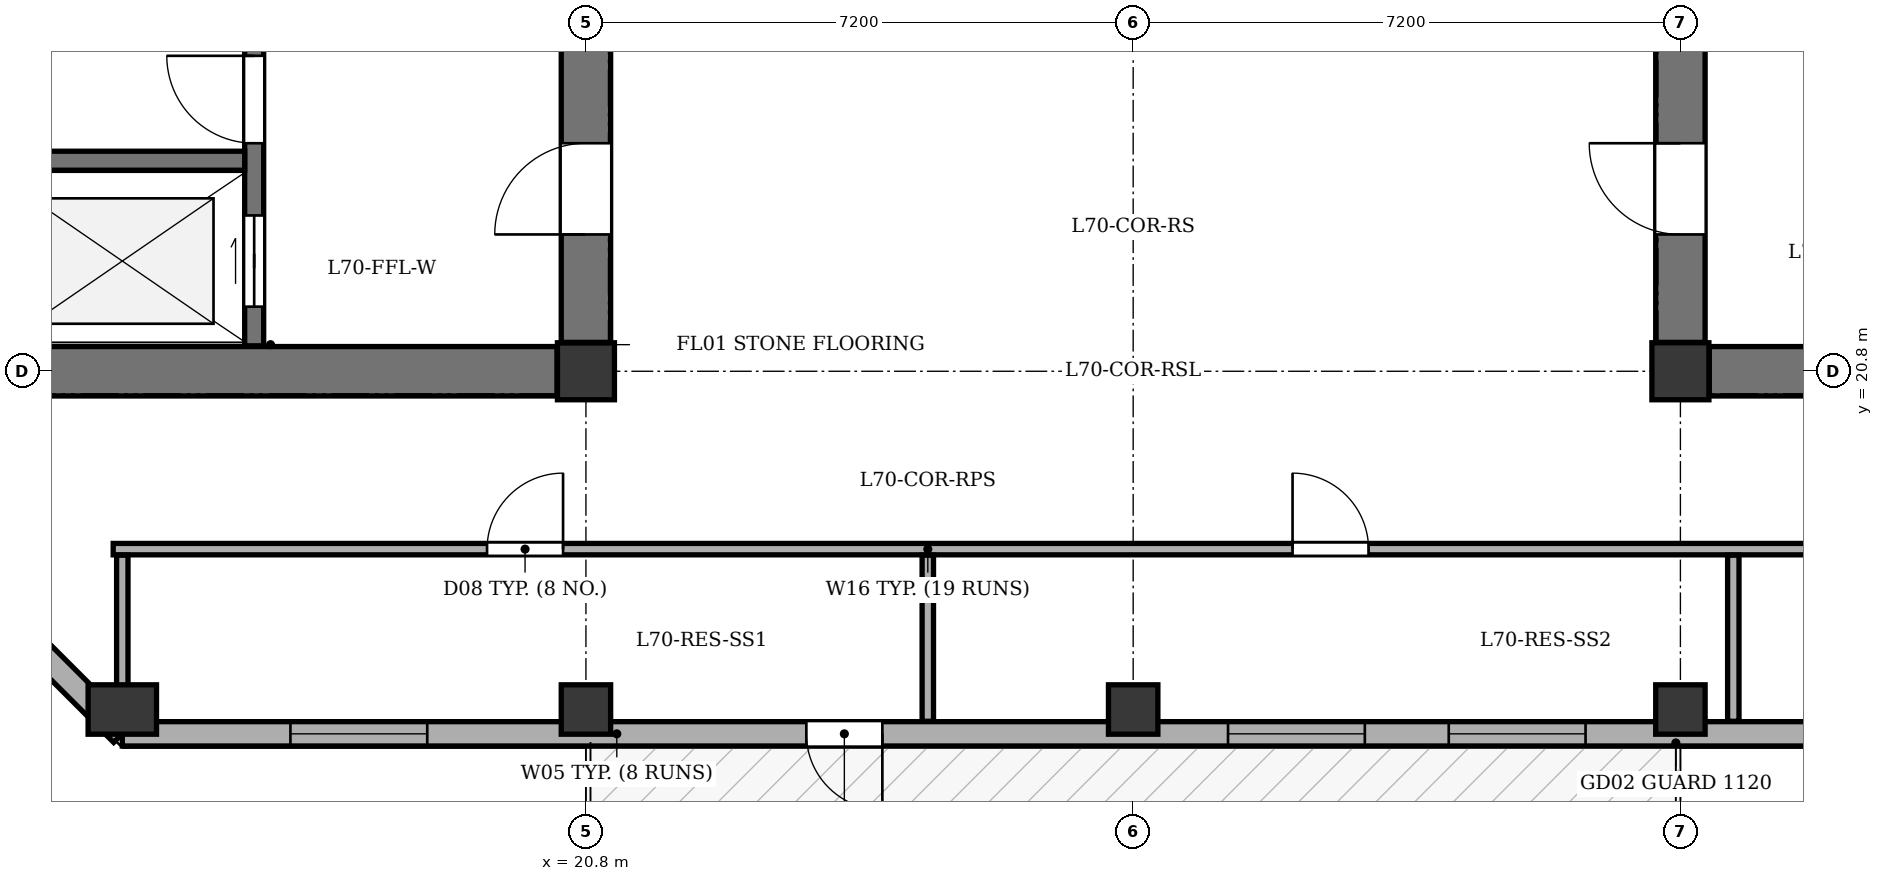
"""IFC4 building model, lengths in metres.
Left out: names, types, materials, properties, quantities, classifications, styles, units other than length and angle.
Written with IfcOpenShell. Run it as: python <this file> out.ifc"""

import sys

from ifc_helpers import new_model, si_unit, direction, frame, frame_2d, origin, origin_2d, place, context, subcontext, project, spatial, rectangle, extrude, element, fill, save


model = new_model("IFC4")
c1 = context("Model", 3, precision=1e-05, world=origin(), true_north=direction((0.0, 1.0)))
c2 = subcontext(c1, "Body", "Model", "MODEL_VIEW")
j1 = project(units=[si_unit("LENGTHUNIT", "METRE"), si_unit("PLANEANGLEUNIT", "RADIAN")], contexts=[c1])
p1 = place(None, origin())
s1 = spatial("IfcSite", under=j1, at=p1, CompositionType="ELEMENT")
p2 = place(p1, origin())
s2 = spatial("IfcBuilding", under=s1, at=p2, CompositionType="ELEMENT")
p3 = place(p2, frame((0.0, 0.0, 265.3)))
s3 = spatial("IfcBuildingStorey", under=s2, at=p3, CompositionType="ELEMENT", Elevation=265.3)
for number, where, z_axis, x_axis in (
    (1, (20.8, 20.8, 0.0), (0.0, 0.0, 1.0), (1.0, 0.0, 0.0)),
    (2, (35.2, 20.8, 0.0), (0.0, 0.0, 1.0), (1.0, 0.0, 0.0)),
):
    element("IfcColumn", number, at=place(p3, frame(where, z_axis=z_axis, x_axis=x_axis)), inside=s3, PredefinedType="COLUMN", context=c2, shape_type="SweptSolid", body=[
        extrude(rectangle(XDim=0.75, YDim=0.75, at=origin_2d()), origin(), (0.0, 0.0, 1.0), 3.4),
    ])
p4 = place(p3, frame((14.7, 16.35, 0.0), z_axis=(0.0, 0.0, 1.0), x_axis=(1.0, 0.0, 0.0)))
e3 = element("IfcColumn", 3, at=p4, inside=s3, PredefinedType="COLUMN", context=c2, shape_type="SweptSolid", body=[
    extrude(rectangle(XDim=0.65, YDim=0.9, at=origin_2d()), origin(), (0.0, 0.0, 1.0), 3.4),
])
for number, where, z_axis, x_axis in (
    (4, (20.8, 16.35, 0.0), (0.0, 0.0, 1.0), (1.0, 0.0, 0.0)),
    (5, (28.0, 16.35, 0.0), (0.0, 0.0, 1.0), (1.0, 0.0, 0.0)),
    (6, (35.2, 16.35, 0.0), (0.0, 0.0, 1.0), (1.0, 0.0, 0.0)),
):
    element("IfcColumn", number, at=place(p3, frame(where, z_axis=z_axis, x_axis=x_axis)), inside=s3, PredefinedType="COLUMN", context=c2, shape_type="SweptSolid", body=[
        extrude(rectangle(XDim=0.65, YDim=0.65, at=origin_2d()), origin(), (0.0, 0.0, 1.0), 3.4),
    ])
p5 = place(p3, frame((51.7, 16.03, 0.0), z_axis=(0.0, 0.0, 1.0), x_axis=(-1.0, 0.0, 0.0)))
e7 = element("IfcWall", 7, at=p5, inside=s3, PredefinedType="STANDARD", context=c2, shape_type="SweptSolid", body=[
    extrude(rectangle(XDim=37.0, YDim=0.32, at=frame_2d((18.5, 0.0))), origin(), (0.0, 0.0, 1.0), 2.335),
])
p6 = place(p5, frame((27.0, 0.0, 0.0)))
e8 = element("IfcOpeningElement", 8, at=p6, cuts=e7, PredefinedType="OPENING", context=c2, shape_type="SweptSolid", body=[
    extrude(rectangle(XDim=1.0, YDim=2.02, at=frame_2d((0.5, 1.01))), frame((0.0, 0.17, 0.0), z_axis=(0.0, -1.0, 0.0), x_axis=(1.0, 0.0, 0.0)), (0.0, 0.0, 1.0), 0.34),
])
p7 = place(p5, frame((2.375, 0.0, 0.75)))
e9 = element("IfcOpeningElement", 9, at=p7, cuts=e7, PredefinedType="OPENING", context=c2, shape_type="SweptSolid", body=[
    extrude(rectangle(XDim=1.8, YDim=1.465, at=frame_2d((0.9, 0.732))), frame((0.0, 0.17, 0.0), z_axis=(0.0, -1.0, 0.0), x_axis=(1.0, 0.0, 0.0)), (0.0, 0.0, 1.0), 0.34),
])
p8 = place(p5, frame((8.422, 0.0, 0.75)))
e10 = element("IfcOpeningElement", 10, at=p8, cuts=e7, PredefinedType="OPENING", context=c2, shape_type="SweptSolid", body=[
    extrude(rectangle(XDim=1.8, YDim=1.465, at=frame_2d((0.9, 0.732))), frame((0.0, 0.17, 0.0), z_axis=(0.0, -1.0, 0.0), x_axis=(1.0, 0.0, 0.0)), (0.0, 0.0, 1.0), 0.34),
])
p9 = place(p5, frame((12.102, 0.0, 0.75)))
e11 = element("IfcOpeningElement", 11, at=p9, cuts=e7, PredefinedType="OPENING", context=c2, shape_type="SweptSolid", body=[
    extrude(rectangle(XDim=2.2, YDim=1.465, at=frame_2d((1.1, 0.732))), frame((0.0, 0.17, 0.0), z_axis=(0.0, -1.0, 0.0), x_axis=(1.0, 0.0, 0.0)), (0.0, 0.0, 1.0), 0.34),
])
p10 = place(p5, frame((17.748, 0.0, 0.75)))
e12 = element("IfcOpeningElement", 12, at=p10, cuts=e7, PredefinedType="OPENING", context=c2, shape_type="SweptSolid", body=[
    extrude(rectangle(XDim=1.8, YDim=1.465, at=frame_2d((0.9, 0.732))), frame((0.0, 0.17, 0.0), z_axis=(0.0, -1.0, 0.0), x_axis=(1.0, 0.0, 0.0)), (0.0, 0.0, 1.0), 0.34),
])
p11 = place(p5, frame((20.652, 0.0, 0.75)))
e13 = element("IfcOpeningElement", 13, at=p11, cuts=e7, PredefinedType="OPENING", context=c2, shape_type="SweptSolid", body=[
    extrude(rectangle(XDim=1.8, YDim=1.465, at=frame_2d((0.9, 0.732))), frame((0.0, 0.17, 0.0), z_axis=(0.0, -1.0, 0.0), x_axis=(1.0, 0.0, 0.0)), (0.0, 0.0, 1.0), 0.34),
])
p12 = place(p5, frame((32.988, 0.0, 0.75)))
e14 = element("IfcOpeningElement", 14, at=p12, cuts=e7, PredefinedType="OPENING", context=c2, shape_type="SweptSolid", body=[
    extrude(rectangle(XDim=1.8, YDim=1.465, at=frame_2d((0.9, 0.732))), frame((0.0, 0.17, 0.0), z_axis=(0.0, -1.0, 0.0), x_axis=(1.0, 0.0, 0.0)), (0.0, 0.0, 1.0), 0.34),
])
p13 = place(p3, frame((14.7, 16.03, 0.0), z_axis=(0.0, 0.0, 1.0), x_axis=(-0.707106781187, 0.707106781187, 0.0)))
e15 = element("IfcWall", 15, at=p13, inside=s3, PredefinedType="STANDARD", context=c2, shape_type="SweptSolid", body=[
    extrude(rectangle(XDim=5.402, YDim=0.32, at=frame_2d((2.701, 0.0))), origin(), (0.0, 0.0, 1.0), 2.335),
])
p14 = place(p13, frame((2.001, 0.0, 0.75)))
e16 = element("IfcOpeningElement", 16, at=p14, cuts=e15, PredefinedType="OPENING", context=c2, shape_type="SweptSolid", body=[
    extrude(rectangle(XDim=1.4, YDim=1.465, at=frame_2d((0.7, 0.732))), frame((0.0, 0.17, 0.0), z_axis=(0.0, -1.0, 0.0), x_axis=(1.0, 0.0, 0.0)), (0.0, 0.0, 1.0), 0.34),
])
p15 = place(p3, frame((13.18, 20.8, 0.0), z_axis=(0.0, 0.0, 1.0), x_axis=(1.0, 0.0, 0.0)))
e17 = element("IfcWall", 17, at=p15, inside=s3, PredefinedType="SHEAR", context=c2, shape_type="SweptSolid", body=[
    extrude(rectangle(XDim=7.24, YDim=0.65, at=frame_2d((3.62, 0.0))), origin(), (0.0, 0.0, 1.0), 2.95),
])
p16 = place(p3, frame((20.8, 21.18, 0.0), z_axis=(0.0, 0.0, 1.0), x_axis=(0.0, 1.0, 0.0)))
e18 = element("IfcWall", 18, at=p16, inside=s3, PredefinedType="SHEAR", context=c2, shape_type="SweptSolid", body=[
    extrude(rectangle(XDim=3.87, YDim=0.65, at=frame_2d((1.935, 0.0))), origin(), (0.0, 0.0, 1.0), 2.95),
])
p17 = place(p16, frame((1.42, 0.0, 0.0)))
e19 = element("IfcOpeningElement", 19, at=p17, cuts=e18, PredefinedType="OPENING", context=c2, shape_type="SweptSolid", body=[
    extrude(rectangle(XDim=1.2, YDim=2.15, at=frame_2d((0.6, 1.075))), frame((0.0, 0.335, 0.0), z_axis=(0.0, -1.0, 0.0), x_axis=(1.0, 0.0, 0.0)), (0.0, 0.0, 1.0), 0.67),
])
p18 = place(p3, frame((16.435, 21.135, 0.0), z_axis=(0.0, 0.0, 1.0), x_axis=(0.0, 1.0, 0.0)))
e20 = element("IfcWall", 20, at=p18, inside=s3, PredefinedType="SHEAR", context=c2, shape_type="SweptSolid", body=[
    extrude(rectangle(XDim=12.13, YDim=0.25, at=frame_2d((6.065, 0.0))), origin(), (0.0, 0.0, 1.0), 2.95),
])
p19 = place(p18, frame((0.515, 0.0, 0.0)))
e21 = element("IfcOpeningElement", 21, at=p19, cuts=e20, PredefinedType="OPENING", context=c2, shape_type="SweptSolid", body=[
    extrude(rectangle(XDim=1.2, YDim=2.15, at=frame_2d((0.6, 1.075))), frame((0.0, 0.135, 0.0), z_axis=(0.0, -1.0, 0.0), x_axis=(1.0, 0.0, 0.0)), (0.0, 0.0, 1.0), 0.27),
])
p20 = place(p18, frame((2.665, 0.0, 0.0)))
e22 = element("IfcOpeningElement", 22, at=p20, cuts=e20, PredefinedType="OPENING", context=c2, shape_type="SweptSolid", body=[
    extrude(rectangle(XDim=1.15, YDim=2.15, at=frame_2d((0.575, 1.075))), frame((0.0, 0.135, 0.0), z_axis=(0.0, -1.0, 0.0), x_axis=(1.0, 0.0, 0.0)), (0.0, 0.0, 1.0), 0.27),
])
p21 = place(p3, frame((13.135, 23.57, 0.0), z_axis=(0.0, 0.0, 1.0), x_axis=(1.0, 0.0, 0.0)))
e23 = element("IfcWall", 23, at=p21, inside=s3, PredefinedType="SHEAR", context=c2, shape_type="SweptSolid", body=[
    extrude(rectangle(XDim=3.175, YDim=0.25, at=frame_2d((1.587, 0.0))), origin(), (0.0, 0.0, 1.0), 2.95),
])
p22 = place(p3, frame((35.58, 20.8, 0.0), z_axis=(0.0, 0.0, 1.0), x_axis=(1.0, 0.0, 0.0)))
e24 = element("IfcWall", 24, at=p22, inside=s3, PredefinedType="SHEAR", context=c2, shape_type="SweptSolid", body=[
    extrude(rectangle(XDim=7.24, YDim=0.65, at=frame_2d((3.62, 0.0))), origin(), (0.0, 0.0, 1.0), 2.95),
])
p23 = place(p3, frame((35.2, 21.18, 0.0), z_axis=(0.0, 0.0, 1.0), x_axis=(0.0, 1.0, 0.0)))
e25 = element("IfcWall", 25, at=p23, inside=s3, PredefinedType="SHEAR", context=c2, shape_type="SweptSolid", body=[
    extrude(rectangle(XDim=3.87, YDim=0.65, at=frame_2d((1.935, 0.0))), origin(), (0.0, 0.0, 1.0), 2.95),
])
p24 = place(p23, frame((1.42, 0.0, 0.0)))
e26 = element("IfcOpeningElement", 26, at=p24, cuts=e25, PredefinedType="OPENING", context=c2, shape_type="SweptSolid", body=[
    extrude(rectangle(XDim=1.2, YDim=2.15, at=frame_2d((0.6, 1.075))), frame((0.0, 0.335, 0.0), z_axis=(0.0, -1.0, 0.0), x_axis=(1.0, 0.0, 0.0)), (0.0, 0.0, 1.0), 0.67),
])
p25 = place(p3, frame((14.58, 18.46, 0.0), z_axis=(0.0, 0.0, 1.0), x_axis=(1.0, 0.0, 0.0)))
e27 = element("IfcWall", 27, at=p25, inside=s3, PredefinedType="PARTITIONING", context=c2, shape_type="SweptSolid", body=[
    extrude(rectangle(XDim=30.52, YDim=0.15, at=frame_2d((15.26, 0.0))), origin(), (0.0, 0.0, 1.0), 2.95),
])
p26 = place(p25, frame((4.919, 0.0, 0.0)))
e28 = element("IfcOpeningElement", 28, at=p26, cuts=e27, PredefinedType="OPENING", context=c2, shape_type="SweptSolid", body=[
    extrude(rectangle(XDim=1.0, YDim=2.1, at=frame_2d((0.5, 1.05))), frame((0.0, 0.085, 0.0), z_axis=(0.0, -1.0, 0.0), x_axis=(1.0, 0.0, 0.0)), (0.0, 0.0, 1.0), 0.17),
])
p27 = place(p25, frame((15.517, 0.0, 0.0)))
e29 = element("IfcOpeningElement", 29, at=p27, cuts=e27, PredefinedType="OPENING", context=c2, shape_type="SweptSolid", body=[
    extrude(rectangle(XDim=1.0, YDim=2.1, at=frame_2d((0.5, 1.05))), frame((0.0, 0.085, 0.0), z_axis=(0.0, -1.0, 0.0), x_axis=(1.0, 0.0, 0.0)), (0.0, 0.0, 1.0), 0.17),
])
p28 = place(p25, frame((25.358, 0.0, 0.0)))
e30 = element("IfcOpeningElement", 30, at=p28, cuts=e27, PredefinedType="OPENING", context=c2, shape_type="SweptSolid", body=[
    extrude(rectangle(XDim=1.0, YDim=2.1, at=frame_2d((0.5, 1.05))), frame((0.0, 0.085, 0.0), z_axis=(0.0, -1.0, 0.0), x_axis=(1.0, 0.0, 0.0)), (0.0, 0.0, 1.0), 0.17),
])
for number, where, z_axis, x_axis in (
    (31, (14.7, 16.195, 0.0), (0.0, 0.0, 1.0), (0.0, 1.0, 0.0)),
    (32, (25.298, 16.195, 0.0), (0.0, 0.0, 1.0), (0.0, 1.0, 0.0)),
    (33, (35.896, 16.195, 0.0), (0.0, 0.0, 1.0), (0.0, 1.0, 0.0)),
):
    element("IfcWall", number, at=place(p3, frame(where, z_axis=z_axis, x_axis=x_axis)), inside=s3, PredefinedType="PARTITIONING", context=c2, shape_type="SweptSolid", body=[
        extrude(rectangle(XDim=2.185, YDim=0.15, at=frame_2d((1.092, 0.0))), origin(), (0.0, 0.0, 1.0), 2.95),
    ])
p29 = place(p6, origin())
e34 = element("IfcDoor", 34, at=p29, inside=s3, OperationType="SINGLE_SWING_LEFT", PredefinedType="DOOR", context=c2, shape_type="SweptSolid", body=[
    extrude(rectangle(XDim=1.0, YDim=2.02, at=frame_2d((0.5, 1.01))), frame((0.0, 0.025, 0.0), z_axis=(0.0, -1.0, 0.0), x_axis=(1.0, 0.0, 0.0)), (0.0, 0.0, 1.0), 0.05),
])
fill(e8, e34)
p30 = place(p10, origin())
e35 = element("IfcWindow", 35, at=p30, inside=s3, PartitioningType="SINGLE_PANEL", PredefinedType="WINDOW", context=c2, shape_type="SweptSolid", body=[
    extrude(rectangle(XDim=1.8, YDim=1.465, at=frame_2d((0.9, 0.732))), frame((0.0, -0.01, 0.0), z_axis=(0.0, -1.0, 0.0), x_axis=(1.0, 0.0, 0.0)), (0.0, 0.0, 1.0), 0.06),
])
fill(e12, e35)
p31 = place(p11, origin())
e36 = element("IfcWindow", 36, at=p31, inside=s3, PartitioningType="SINGLE_PANEL", PredefinedType="WINDOW", context=c2, shape_type="SweptSolid", body=[
    extrude(rectangle(XDim=1.8, YDim=1.465, at=frame_2d((0.9, 0.732))), frame((0.0, -0.01, 0.0), z_axis=(0.0, -1.0, 0.0), x_axis=(1.0, 0.0, 0.0)), (0.0, 0.0, 1.0), 0.06),
])
fill(e13, e36)
p32 = place(p12, origin())
e37 = element("IfcWindow", 37, at=p32, inside=s3, PartitioningType="SINGLE_PANEL", PredefinedType="WINDOW", context=c2, shape_type="SweptSolid", body=[
    extrude(rectangle(XDim=1.8, YDim=1.465, at=frame_2d((0.9, 0.732))), frame((0.0, -0.01, 0.0), z_axis=(0.0, -1.0, 0.0), x_axis=(1.0, 0.0, 0.0)), (0.0, 0.0, 1.0), 0.06),
])
fill(e14, e37)
p33 = place(p17, origin())
e38 = element("IfcDoor", 38, at=p33, inside=s3, OperationType="SINGLE_SWING_LEFT", PredefinedType="DOOR", context=c2, shape_type="SweptSolid", body=[
    extrude(rectangle(XDim=1.2, YDim=2.15, at=frame_2d((0.6, 1.075))), frame((0.0, 0.025, 0.0), z_axis=(0.0, -1.0, 0.0), x_axis=(1.0, 0.0, 0.0)), (0.0, 0.0, 1.0), 0.05),
])
fill(e19, e38)
p34 = place(p19, origin())
e39 = element("IfcDoor", 39, at=p34, inside=s3, OperationType="DOUBLE_DOOR_SLIDING", PredefinedType="DOOR", context=c2, shape_type="SweptSolid", body=[
    extrude(rectangle(XDim=1.2, YDim=2.15, at=frame_2d((0.6, 1.075))), frame((0.0, 0.025, 0.0), z_axis=(0.0, -1.0, 0.0), x_axis=(1.0, 0.0, 0.0)), (0.0, 0.0, 1.0), 0.05),
])
fill(e21, e39)
p35 = place(p20, origin())
e40 = element("IfcDoor", 40, at=p35, inside=s3, OperationType="SINGLE_SWING_RIGHT", PredefinedType="DOOR", context=c2, shape_type="SweptSolid", body=[
    extrude(rectangle(XDim=1.15, YDim=2.15, at=frame_2d((0.575, 1.075))), frame((0.0, 0.025, 0.0), z_axis=(0.0, -1.0, 0.0), x_axis=(1.0, 0.0, 0.0)), (0.0, 0.0, 1.0), 0.05),
])
fill(e22, e40)
p36 = place(p24, origin())
e41 = element("IfcDoor", 41, at=p36, inside=s3, OperationType="SINGLE_SWING_RIGHT", PredefinedType="DOOR", context=c2, shape_type="SweptSolid", body=[
    extrude(rectangle(XDim=1.2, YDim=2.15, at=frame_2d((0.6, 1.075))), frame((0.0, 0.025, 0.0), z_axis=(0.0, -1.0, 0.0), x_axis=(1.0, 0.0, 0.0)), (0.0, 0.0, 1.0), 0.05),
])
fill(e26, e41)
p37 = place(p26, origin())
e42 = element("IfcDoor", 42, at=p37, inside=s3, OperationType="SINGLE_SWING_RIGHT", PredefinedType="DOOR", context=c2, shape_type="SweptSolid", body=[
    extrude(rectangle(XDim=1.0, YDim=2.1, at=frame_2d((0.5, 1.05))), frame((0.0, 0.025, 0.0), z_axis=(0.0, -1.0, 0.0), x_axis=(1.0, 0.0, 0.0)), (0.0, 0.0, 1.0), 0.05),
])
fill(e28, e42)
p38 = place(p27, origin())
e43 = element("IfcDoor", 43, at=p38, inside=s3, OperationType="SINGLE_SWING_LEFT", PredefinedType="DOOR", context=c2, shape_type="SweptSolid", body=[
    extrude(rectangle(XDim=1.0, YDim=2.1, at=frame_2d((0.5, 1.05))), frame((0.0, 0.025, 0.0), z_axis=(0.0, -1.0, 0.0), x_axis=(1.0, 0.0, 0.0)), (0.0, 0.0, 1.0), 0.05),
])
fill(e29, e43)
save(model, sys.argv[1])
